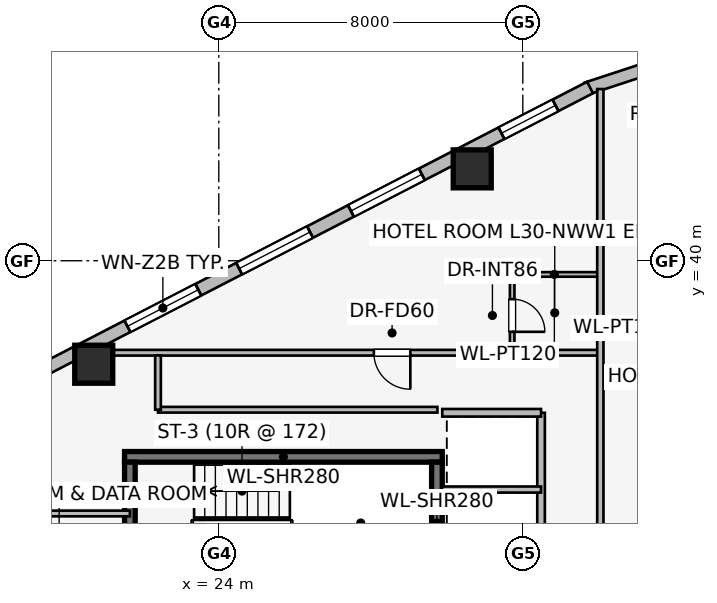
"""IFC4 building model, lengths in metres.
Left out: names, types, materials, properties, quantities, classifications, styles, units other than length and angle.
Written with IfcOpenShell. Run it as: python <this file> out.ifc"""

import sys

from ifc_helpers import new_model, si_unit, direction, frame, frame_2d, origin, origin_2d, place, context, subcontext, project, spatial, rectangle, extrude, element, fill, save


model = new_model("IFC4")
c1 = context("Model", 3, precision=1e-05, world=origin(), true_north=direction((0.0, 1.0)))
c2 = subcontext(c1, "Body", "Model", "MODEL_VIEW")
j1 = project(units=[si_unit("LENGTHUNIT", "METRE"), si_unit("PLANEANGLEUNIT", "RADIAN")], contexts=[c1])
p1 = place(None, origin())
s1 = spatial("IfcSite", under=j1, at=p1, CompositionType="ELEMENT")
p2 = place(p1, origin())
s2 = spatial("IfcBuilding", under=s1, at=p2, CompositionType="ELEMENT")
p3 = place(p2, frame((0.0, 0.0, 115.35)))
s3 = spatial("IfcBuildingStorey", under=s2, at=p3, CompositionType="ELEMENT", Elevation=115.35)
p4 = place(p3, frame((29.88, 34.84, 0.0), z_axis=(0.0, 0.0, 1.0), x_axis=(-1.0, 0.0, 0.0)))
e1 = element("IfcWall", 1, at=p4, inside=s3, PredefinedType="SHEAR", context=c2, shape_type="SweptSolid", body=[
    extrude(rectangle(XDim=8.36, YDim=0.28, at=frame_2d((4.18, 0.0))), origin(), (0.0, 0.0, 1.0), 3.45),
])
for number, where, z_axis, x_axis in (
    (2, (21.66, 34.7, 0.0), (0.0, 0.0, 1.0), (0.0, -1.0, 0.0)),
    (3, (29.74, 31.5, 0.0), (0.0, 0.0, 1.0), (0.0, 1.0, 0.0)),
):
    element("IfcWall", number, at=place(p3, frame(where, z_axis=z_axis, x_axis=x_axis)), inside=s3, PredefinedType="SHEAR", context=c2, shape_type="SweptSolid", body=[
        extrude(rectangle(XDim=3.2, YDim=0.28, at=frame_2d((1.6, 0.0))), origin(), (0.0, 0.0, 1.0), 3.45),
    ])
for number, where, z_axis, x_axis in (
    (4, (30.669, 42.418, 0.0), (0.0, 0.0, 1.0), (1.0, 0.0, 0.0)),
    (5, (20.709, 37.277, 0.0), (0.0, 0.0, 1.0), (1.0, 0.0, 0.0)),
):
    element("IfcColumn", number, at=place(p3, frame(where, z_axis=z_axis, x_axis=x_axis)), inside=s3, PredefinedType="COLUMN", context=c2, shape_type="SweptSolid", body=[
        extrude(rectangle(XDim=1.0, YDim=1.0, at=origin_2d()), origin(), (0.0, 0.0, 1.0), 3.45),
    ])
p5 = place(p3, frame((33.681, 44.532, 0.0), z_axis=(0.0, 0.0, 1.0), x_axis=(0.949937416267, 0.312440242569, 0.0)))
e6 = element("IfcWall", 6, at=p5, inside=s3, PredefinedType="STANDARD", context=c2, shape_type="SweptSolid", body=[
    extrude(rectangle(XDim=1.722, YDim=0.33, at=frame_2d((0.861, 0.0))), origin(), (0.0, 0.0, 1.0), 3.16),
])
p6 = place(p3, frame((17.169, 35.99, 0.0), z_axis=(0.0, 0.0, 1.0), x_axis=(0.888613612362, 0.458656568606, 0.0)))
e7 = element("IfcWall", 7, at=p6, inside=s3, PredefinedType="STANDARD", context=c2, shape_type="SweptSolid", body=[
    extrude(rectangle(XDim=18.681, YDim=0.34, at=frame_2d((9.34, 0.0))), origin(), (0.0, 0.0, 1.0), 3.16),
])
p7 = place(p6, frame((1.023, 0.0, 0.75)))
e8 = element("IfcOpeningElement", 8, at=p7, cuts=e7, PredefinedType="OPENING", context=c2, shape_type="SweptSolid", body=[
    extrude(rectangle(XDim=1.6, YDim=1.55, at=frame_2d((0.8, 0.775))), frame((0.0, 0.18, 0.0), z_axis=(0.0, -1.0, 0.0), x_axis=(1.0, 0.0, 0.0)), (0.0, 0.0, 1.0), 0.36),
])
p8 = place(p6, frame((4.981, 0.0, 0.75)))
e9 = element("IfcOpeningElement", 9, at=p8, cuts=e7, PredefinedType="OPENING", context=c2, shape_type="SweptSolid", body=[
    extrude(rectangle(XDim=2.1, YDim=1.5, at=frame_2d((1.05, 0.75))), frame((0.0, 0.18, 0.0), z_axis=(0.0, -1.0, 0.0), x_axis=(1.0, 0.0, 0.0)), (0.0, 0.0, 1.0), 0.36),
])
p9 = place(p6, frame((8.29, 0.0, 0.75)))
e10 = element("IfcOpeningElement", 10, at=p9, cuts=e7, PredefinedType="OPENING", context=c2, shape_type="SweptSolid", body=[
    extrude(rectangle(XDim=2.1, YDim=1.5, at=frame_2d((1.05, 0.75))), frame((0.0, 0.18, 0.0), z_axis=(0.0, -1.0, 0.0), x_axis=(1.0, 0.0, 0.0)), (0.0, 0.0, 1.0), 0.36),
])
p10 = place(p6, frame((11.6, 0.0, 0.75)))
e11 = element("IfcOpeningElement", 11, at=p10, cuts=e7, PredefinedType="OPENING", context=c2, shape_type="SweptSolid", body=[
    extrude(rectangle(XDim=2.1, YDim=1.5, at=frame_2d((1.05, 0.75))), frame((0.0, 0.18, 0.0), z_axis=(0.0, -1.0, 0.0), x_axis=(1.0, 0.0, 0.0)), (0.0, 0.0, 1.0), 0.36),
])
p11 = place(p6, frame((16.058, 0.0, 0.75)))
e12 = element("IfcOpeningElement", 12, at=p11, cuts=e7, PredefinedType="OPENING", context=c2, shape_type="SweptSolid", body=[
    extrude(rectangle(XDim=1.6, YDim=1.55, at=frame_2d((0.8, 0.775))), frame((0.0, 0.18, 0.0), z_axis=(0.0, -1.0, 0.0), x_axis=(1.0, 0.0, 0.0)), (0.0, 0.0, 1.0), 0.36),
])
p12 = place(p3, frame((32.48, 31.95, 0.0), z_axis=(0.0, 0.0, 1.0), x_axis=(0.0, 1.0, 0.0)))
e13 = element("IfcWall", 13, at=p12, inside=s3, PredefinedType="PARTITIONING", context=c2, shape_type="SweptSolid", body=[
    extrude(rectangle(XDim=4.05, YDim=0.2, at=frame_2d((2.025, 0.0))), origin(), (0.0, 0.0, 1.0), 3.16),
])
p13 = place(p3, frame((29.88, 36.0, 0.0), z_axis=(0.0, 0.0, 1.0), x_axis=(1.0, 0.0, 0.0)))
e14 = element("IfcWall", 14, at=p13, inside=s3, PredefinedType="PARTITIONING", context=c2, shape_type="SweptSolid", body=[
    extrude(rectangle(XDim=2.6, YDim=0.2, at=frame_2d((1.3, 0.0))), origin(), (0.0, 0.0, 1.0), 2.552),
])
p14 = place(p3, frame((29.875, 33.98, 0.0), z_axis=(0.0, 0.0, 1.0), x_axis=(1.0, 0.0, 0.0)))
e15 = element("IfcWall", 15, at=p14, inside=s3, PredefinedType="PARTITIONING", context=c2, shape_type="SweptSolid", body=[
    extrude(rectangle(XDim=2.605, YDim=0.16, at=frame_2d((1.302, 0.0))), origin(), (0.0, 0.0, 1.0), 3.16),
])
p15 = place(p3, frame((21.66, 33.35, 0.0), z_axis=(0.0, 0.0, 1.0), x_axis=(-1.0, 0.0, 0.0)))
e16 = element("IfcWall", 16, at=p15, inside=s3, PredefinedType="PARTITIONING", context=c2, shape_type="SweptSolid", body=[
    extrude(rectangle(XDim=2.56, YDim=0.15, at=frame_2d((1.28, 0.0))), origin(), (0.0, 0.0, 1.0), 3.16),
])
p16 = place(p3, frame((34.0, 39.64, 0.0), z_axis=(0.0, 0.0, 1.0), x_axis=(-1.0, 0.0, 0.0)))
e17 = element("IfcWall", 17, at=p16, inside=s3, PredefinedType="PARTITIONING", context=c2, shape_type="SweptSolid", body=[
    extrude(rectangle(XDim=2.34, YDim=0.12, at=frame_2d((1.17, 0.0))), origin(), (0.0, 0.0, 1.0), 2.552),
])
p17 = place(p3, frame((31.72, 39.64, 0.0), z_axis=(0.0, 0.0, 1.0), x_axis=(0.0, -1.0, 0.0)))
e18 = element("IfcWall", 18, at=p17, inside=s3, PredefinedType="PARTITIONING", context=c2, shape_type="SweptSolid", body=[
    extrude(rectangle(XDim=2.06, YDim=0.12, at=frame_2d((1.03, 0.0))), origin(), (0.0, 0.0, 1.0), 3.16),
])
p18 = place(p17, frame((0.65, 0.0, 0.0)))
e19 = element("IfcOpeningElement", 19, at=p18, cuts=e18, PredefinedType="OPENING", context=c2, shape_type="SweptSolid", body=[
    extrude(rectangle(XDim=0.86, YDim=2.0, at=frame_2d((0.43, 1.0))), frame((0.0, 0.07, 0.0), z_axis=(0.0, -1.0, 0.0), x_axis=(1.0, 0.0, 0.0)), (0.0, 0.0, 1.0), 0.14),
])
p19 = place(p3, frame((34.0, 37.58, 0.0), z_axis=(0.0, 0.0, 1.0), x_axis=(-1.0, 0.0, 0.0)))
e20 = element("IfcWall", 20, at=p19, inside=s3, PredefinedType="PARTITIONING", context=c2, shape_type="SweptSolid", body=[
    extrude(rectangle(XDim=13.707, YDim=0.15, at=frame_2d((6.854, 0.0))), origin(), (0.0, 0.0, 1.0), 2.627),
])
p20 = place(p19, frame((4.96, 0.0, 0.0)))
e21 = element("IfcOpeningElement", 21, at=p20, cuts=e20, PredefinedType="OPENING", context=c2, shape_type="SweptSolid", body=[
    extrude(rectangle(XDim=0.96, YDim=2.0, at=frame_2d((0.48, 1.0))), frame((0.0, 0.085, 0.0), z_axis=(0.0, -1.0, 0.0), x_axis=(1.0, 0.0, 0.0)), (0.0, 0.0, 1.0), 0.17),
])
p21 = place(p3, frame((34.04, 31.96, 0.0), z_axis=(0.0, 0.0, 1.0), x_axis=(0.0, 1.0, 0.0)))
e22 = element("IfcWall", 22, at=p21, inside=s3, PredefinedType="PARTITIONING", context=c2, shape_type="SweptSolid", body=[
    extrude(rectangle(XDim=12.558, YDim=0.165, at=frame_2d((6.279, 0.0))), origin(), (0.0, 0.0, 1.0), 3.16),
])
p22 = place(p3, frame((29.753, 36.08, 0.0), z_axis=(0.0, 0.0, 1.0), x_axis=(-1.0, 0.0, 0.0)))
e23 = element("IfcWall", 23, at=p22, inside=s3, PredefinedType="PARTITIONING", context=c2, shape_type="SweptSolid", body=[
    extrude(rectangle(XDim=7.353, YDim=0.15, at=frame_2d((3.677, 0.0))), origin(), (0.0, 0.0, 1.0), 2.627),
])
p23 = place(p3, frame((22.4, 36.08, 0.0), z_axis=(0.0, 0.0, 1.0), x_axis=(0.0, 1.0, 0.0)))
e24 = element("IfcWall", 24, at=p23, inside=s3, PredefinedType="PARTITIONING", context=c2, shape_type="SweptSolid", body=[
    extrude(rectangle(XDim=1.43, YDim=0.15, at=frame_2d((0.715, 0.0))), origin(), (0.0, 0.0, 1.0), 3.16),
])
p24 = place(p8, origin())
e25 = element("IfcWindow", 25, at=p24, inside=s3, PartitioningType="SINGLE_PANEL", PredefinedType="WINDOW", context=c2, shape_type="SweptSolid", body=[
    extrude(rectangle(XDim=2.1, YDim=1.5, at=frame_2d((1.05, 0.75))), frame((0.0, 0.03, 0.0), z_axis=(0.0, -1.0, 0.0), x_axis=(1.0, 0.0, 0.0)), (0.0, 0.0, 1.0), 0.06),
])
fill(e9, e25)
p25 = place(p9, origin())
e26 = element("IfcWindow", 26, at=p25, inside=s3, PartitioningType="SINGLE_PANEL", PredefinedType="WINDOW", context=c2, shape_type="SweptSolid", body=[
    extrude(rectangle(XDim=2.1, YDim=1.5, at=frame_2d((1.05, 0.75))), frame((0.0, 0.03, 0.0), z_axis=(0.0, -1.0, 0.0), x_axis=(1.0, 0.0, 0.0)), (0.0, 0.0, 1.0), 0.06),
])
fill(e10, e26)
p26 = place(p10, origin())
e27 = element("IfcWindow", 27, at=p26, inside=s3, PartitioningType="SINGLE_PANEL", PredefinedType="WINDOW", context=c2, shape_type="SweptSolid", body=[
    extrude(rectangle(XDim=2.1, YDim=1.5, at=frame_2d((1.05, 0.75))), frame((0.0, 0.03, 0.0), z_axis=(0.0, -1.0, 0.0), x_axis=(1.0, 0.0, 0.0)), (0.0, 0.0, 1.0), 0.06),
])
fill(e11, e27)
p27 = place(p11, origin())
e28 = element("IfcWindow", 28, at=p27, inside=s3, PartitioningType="SINGLE_PANEL", PredefinedType="WINDOW", context=c2, shape_type="SweptSolid", body=[
    extrude(rectangle(XDim=1.6, YDim=1.55, at=frame_2d((0.8, 0.775))), frame((0.0, 0.03, 0.0), z_axis=(0.0, -1.0, 0.0), x_axis=(1.0, 0.0, 0.0)), (0.0, 0.0, 1.0), 0.06),
])
fill(e12, e28)
p28 = place(p18, origin())
e29 = element("IfcDoor", 29, at=p28, inside=s3, OperationType="SINGLE_SWING_RIGHT", PredefinedType="DOOR", context=c2, shape_type="SweptSolid", body=[
    extrude(rectangle(XDim=0.86, YDim=2.0, at=frame_2d((0.43, 1.0))), frame((0.0, 0.025, 0.0), z_axis=(0.0, -1.0, 0.0), x_axis=(1.0, 0.0, 0.0)), (0.0, 0.0, 1.0), 0.05),
])
fill(e19, e29)
p29 = place(p20, origin())
e30 = element("IfcDoor", 30, at=p29, inside=s3, OperationType="SINGLE_SWING_LEFT", PredefinedType="DOOR", context=c2, shape_type="SweptSolid", body=[
    extrude(rectangle(XDim=0.96, YDim=2.0, at=frame_2d((0.48, 1.0))), frame((0.0, 0.025, 0.0), z_axis=(0.0, -1.0, 0.0), x_axis=(1.0, 0.0, 0.0)), (0.0, 0.0, 1.0), 0.05),
])
fill(e21, e30)
save(model, sys.argv[1])
